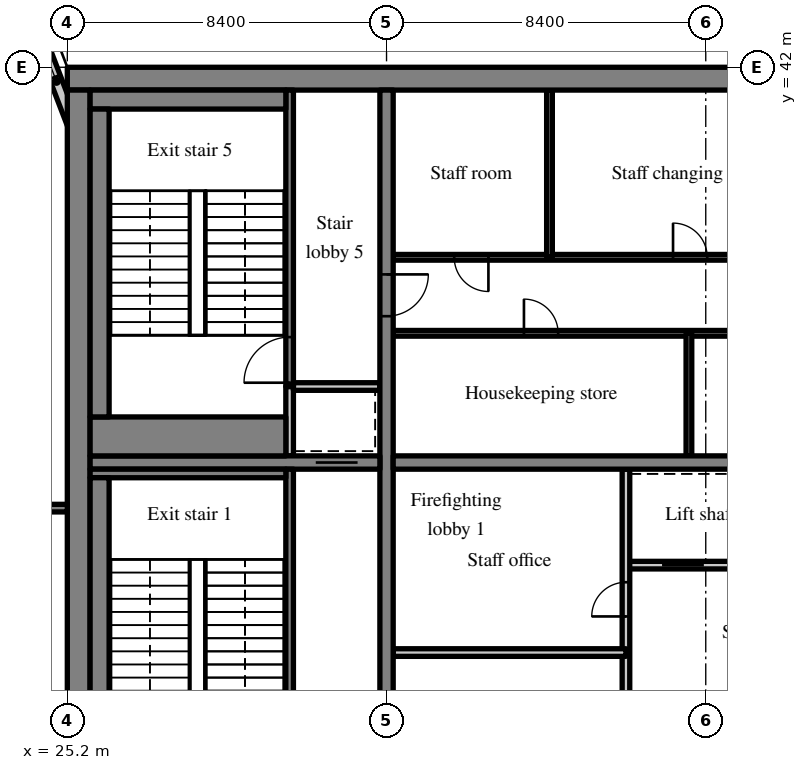
"""IFC4 building model, lengths in metres.
Left out: names, types, materials, properties, quantities, classifications, styles, units other than length and angle.
Written with IfcOpenShell. Run it as: python <this file> out.ifc"""

import sys

from ifc_helpers import new_model, si_unit, direction, frame, frame_2d, origin, place, context, subcontext, project, spatial, rectangle, extrude, source, transform, mapped, element, fill, save


model = new_model("IFC4")
c1 = context("Model", 3, precision=1e-05, world=origin(), true_north=direction((0.0, 1.0)))
c2 = subcontext(c1, "Body", "Model", "MODEL_VIEW")
j1 = project(units=[si_unit("LENGTHUNIT", "METRE"), si_unit("PLANEANGLEUNIT", "RADIAN")], contexts=[c1])
p1 = place(None, origin())
s1 = spatial("IfcSite", under=j1, at=p1, CompositionType="ELEMENT")
p2 = place(p1, origin())
s2 = spatial("IfcBuilding", under=s1, at=p2, CompositionType="ELEMENT")
p3 = place(p2, frame((0.0, 0.0, 229.6)))
s3 = spatial("IfcBuildingStorey", under=s2, at=p3, CompositionType="ELEMENT", Elevation=229.6)
m1 = source(origin(), c2, "Body", "SweptSolid", [
    extrude(rectangle(XDim=50.4, YDim=0.6, at=frame_2d((25.2, 0.0))), origin(), (0.0, 0.0, 1.0), 3.62),
])
p4 = place(p3, frame((25.2, 41.7, 0.0), z_axis=(0.0, 0.0, 1.0), x_axis=(1.0, 0.0, 0.0)))
e1 = element("IfcWall", 1, at=p4, inside=s3, PredefinedType="SHEAR", context=c2, shape_type="MappedRepresentation", body=[
    mapped(m1, transform((0.0, 0.0, 0.0), scale=1.0)),
])
m2 = source(origin(), c2, "Body", "SweptSolid", [
    extrude(rectangle(XDim=18.8, YDim=0.6, at=frame_2d((9.4, 0.0))), origin(), (0.0, 0.0, 1.0), 3.62),
])
p5 = place(p3, frame((25.5, 22.6, 0.0), z_axis=(0.0, 0.0, 1.0), x_axis=(0.0, 1.0, 0.0)))
e2 = element("IfcWall", 2, at=p5, inside=s3, PredefinedType="SHEAR", context=c2, shape_type="MappedRepresentation", body=[
    mapped(m2, transform((0.0, 0.0, 0.0), scale=1.0)),
])
m3 = source(origin(), c2, "Body", "SweptSolid", [
    extrude(rectangle(XDim=18.8, YDim=0.35, at=frame_2d((9.4, 0.0))), origin(), (0.0, 0.0, 1.0), 3.62),
])
p6 = place(p3, frame((33.6, 22.6, 0.0), z_axis=(0.0, 0.0, 1.0), x_axis=(0.0, 1.0, 0.0)))
e3 = element("IfcWall", 3, at=p6, inside=s3, PredefinedType="SHEAR", context=c2, shape_type="MappedRepresentation", body=[
    mapped(m3, transform((0.0, 0.0, 0.0), scale=1.0)),
])
m4 = source(origin(), c2, "Body", "SweptSolid", [
    extrude(rectangle(XDim=1.1, YDim=2.1, at=frame_2d((0.55, 1.05))), frame((0.0, 0.185, 0.0), z_axis=(0.0, -1.0, 0.0), x_axis=(1.0, 0.0, 0.0)), (0.0, 0.0, 1.0), 0.37),
])
p7 = place(p6, frame((12.85, 0.0, 0.0)))
e4 = element("IfcOpeningElement", 4, at=p7, cuts=e3, PredefinedType="OPENING", context=c2, shape_type="MappedRepresentation", body=[
    mapped(m4, transform((0.0, 0.0, 0.0), scale=1.0)),
])
m5 = source(origin(), c2, "Body", "SweptSolid", [
    extrude(rectangle(XDim=7.625, YDim=0.35, at=frame_2d((3.812, 0.0))), origin(), (0.0, 0.0, 1.0), 3.62),
])
p8 = place(p3, frame((25.8, 31.6, 0.0), z_axis=(0.0, 0.0, 1.0), x_axis=(1.0, 0.0, 0.0)))
e5 = element("IfcWall", 5, at=p8, inside=s3, PredefinedType="SHEAR", context=c2, shape_type="MappedRepresentation", body=[
    mapped(m5, transform((0.0, 0.0, 0.0), scale=1.0)),
])
p9 = place(p8, frame((5.938, 0.0, 0.0)))
e6 = element("IfcOpeningElement", 6, at=p9, cuts=e5, PredefinedType="OPENING", context=c2, shape_type="MappedRepresentation", body=[
    mapped(m4, transform((0.0, 0.0, 0.0), scale=1.0)),
])
m6 = source(origin(), c2, "Body", "SweptSolid", [
    extrude(rectangle(XDim=16.45, YDim=0.35, at=frame_2d((8.225, 0.0))), origin(), (0.0, 0.0, 1.0), 3.62),
])
p10 = place(p3, frame((33.775, 31.6, 0.0), z_axis=(0.0, 0.0, 1.0), x_axis=(1.0, 0.0, 0.0)))
e7 = element("IfcWall", 7, at=p10, inside=s3, PredefinedType="SHEAR", context=c2, shape_type="MappedRepresentation", body=[
    mapped(m6, transform((0.0, 0.0, 0.0), scale=1.0)),
])
m7 = source(origin(), c2, "Body", "SweptSolid", [
    extrude(rectangle(XDim=1.0, YDim=2.1, at=frame_2d((0.5, 1.05))), frame((0.0, 0.185, 0.0), z_axis=(0.0, -1.0, 0.0), x_axis=(1.0, 0.0, 0.0)), (0.0, 0.0, 1.0), 0.37),
])
p11 = place(p10, frame((14.837, 0.0, 0.0)))
e8 = element("IfcOpeningElement", 8, at=p11, cuts=e7, PredefinedType="OPENING", context=c2, shape_type="MappedRepresentation", body=[
    mapped(m7, transform((0.0, 0.0, 0.0), scale=1.0)),
])
m8 = source(origin(), c2, "Body", "SweptSolid", [
    extrude(rectangle(XDim=3.559, YDim=0.3, at=frame_2d((1.78, 0.0))), origin(), (0.0, 0.0, 1.0), 3.62),
])
p12 = place(p3, frame((25.55, 39.969, 0.0), z_axis=(0.0, 0.0, 1.0), x_axis=(-0.35779745313, 0.933799219604, 0.0)))
e9 = element("IfcWall", 9, at=p12, inside=s3, PredefinedType="SOLIDWALL", context=c2, shape_type="MappedRepresentation", body=[
    mapped(m8, transform((0.0, 0.0, 0.0), scale=1.0)),
])
m9 = source(origin(), c2, "Body", "SweptSolid", [
    extrude(rectangle(XDim=1.5, YDim=2.0, at=frame_2d((0.75, 1.0))), frame((0.0, 0.16, 0.0), z_axis=(0.0, -1.0, 0.0), x_axis=(1.0, 0.0, 0.0)), (0.0, 0.0, 1.0), 0.32),
])
p13 = place(p12, frame((1.903, 0.0, 0.9)))
e10 = element("IfcOpeningElement", 10, at=p13, cuts=e9, PredefinedType="OPENING", context=c2, shape_type="MappedRepresentation", body=[
    mapped(m9, transform((0.0, 0.0, 0.0), scale=1.0)),
])
m10 = source(origin(), c2, "Body", "SweptSolid", [
    extrude(rectangle(XDim=6.0, YDim=0.2, at=frame_2d((3.0, 0.0))), origin(), (0.0, 0.0, 1.0), 3.62),
])
p14 = place(p3, frame((39.9, 28.9, 0.0), z_axis=(0.0, 0.0, 1.0), x_axis=(1.0, 0.0, 0.0)))
e11 = element("IfcWall", 11, at=p14, inside=s3, PredefinedType="SOLIDWALL", context=c2, shape_type="MappedRepresentation", body=[
    mapped(m10, transform((0.0, 0.0, 0.0), scale=1.0)),
])
m11 = source(origin(), c2, "Body", "SweptSolid", [
    extrude(rectangle(XDim=1.1, YDim=2.1, at=frame_2d((0.55, 1.05))), frame((0.0, 0.11, 0.0), z_axis=(0.0, -1.0, 0.0), x_axis=(1.0, 0.0, 0.0)), (0.0, 0.0, 1.0), 0.22),
])
p15 = place(p14, frame((0.95, 0.0, 0.0)))
e12 = element("IfcOpeningElement", 12, at=p15, cuts=e11, PredefinedType="OPENING", context=c2, shape_type="MappedRepresentation", body=[
    mapped(m11, transform((0.0, 0.0, 0.0), scale=1.0)),
])
p16 = place(p14, frame((3.95, 0.0, 0.0)))
e13 = element("IfcOpeningElement", 13, at=p16, cuts=e11, PredefinedType="OPENING", context=c2, shape_type="MappedRepresentation", body=[
    mapped(m11, transform((0.0, 0.0, 0.0), scale=1.0)),
])
m12 = source(origin(), c2, "Body", "SweptSolid", [
    extrude(rectangle(XDim=8.825, YDim=0.2, at=frame_2d((4.413, 0.0))), origin(), (0.0, 0.0, 1.0), 3.62),
])
p17 = place(p3, frame((39.9, 22.6, 0.0), z_axis=(0.0, 0.0, 1.0), x_axis=(0.0, 1.0, 0.0)))
e14 = element("IfcWall", 14, at=p17, inside=s3, PredefinedType="PARTITIONING", context=c2, shape_type="MappedRepresentation", body=[
    mapped(m12, transform((0.0, 0.0, 0.0), scale=1.0)),
])
m13 = source(origin(), c2, "Body", "SweptSolid", [
    extrude(rectangle(XDim=0.9, YDim=2.1, at=frame_2d((0.45, 1.05))), frame((0.0, 0.11, 0.0), z_axis=(0.0, -1.0, 0.0), x_axis=(1.0, 0.0, 0.0)), (0.0, 0.0, 1.0), 0.22),
])
p18 = place(p17, frame((4.95, 0.0, 0.0)))
e15 = element("IfcOpeningElement", 15, at=p18, cuts=e14, PredefinedType="OPENING", context=c2, shape_type="MappedRepresentation", body=[
    mapped(m13, transform((0.0, 0.0, 0.0), scale=1.0)),
])
m14 = source(origin(), c2, "Body", "SweptSolid", [
    extrude(rectangle(XDim=6.125, YDim=0.2, at=frame_2d((3.062, 0.0))), origin(), (0.0, 0.0, 1.0), 3.62),
])
p19 = place(p3, frame((33.775, 26.6, 0.0), z_axis=(0.0, 0.0, 1.0), x_axis=(1.0, 0.0, 0.0)))
e16 = element("IfcWall", 16, at=p19, inside=s3, PredefinedType="PARTITIONING", context=c2, shape_type="MappedRepresentation", body=[
    mapped(m14, transform((0.0, 0.0, 0.0), scale=1.0)),
])
m15 = source(origin(), c2, "Body", "SweptSolid", [
    extrude(rectangle(XDim=14.225, YDim=0.15, at=frame_2d((7.113, 0.0))), origin(), (0.0, 0.0, 1.0), 3.62),
])
p20 = place(p3, frame((33.775, 35.0, 0.0), z_axis=(0.0, 0.0, 1.0), x_axis=(1.0, 0.0, 0.0)))
e17 = element("IfcWall", 17, at=p20, inside=s3, PredefinedType="PARTITIONING", context=c2, shape_type="MappedRepresentation", body=[
    mapped(m15, transform((0.0, 0.0, 0.0), scale=1.0)),
])
m16 = source(origin(), c2, "Body", "SweptSolid", [
    extrude(rectangle(XDim=0.9, YDim=2.1, at=frame_2d((0.45, 1.05))), frame((0.0, 0.085, 0.0), z_axis=(0.0, -1.0, 0.0), x_axis=(1.0, 0.0, 0.0)), (0.0, 0.0, 1.0), 0.17),
])
p21 = place(p20, frame((3.441, 0.0, 0.0)))
e18 = element("IfcOpeningElement", 18, at=p21, cuts=e17, PredefinedType="OPENING", context=c2, shape_type="MappedRepresentation", body=[
    mapped(m16, transform((0.0, 0.0, 0.0), scale=1.0)),
])
p22 = place(p20, frame((10.516, 0.0, 0.0)))
e19 = element("IfcOpeningElement", 19, at=p22, cuts=e17, PredefinedType="OPENING", context=c2, shape_type="MappedRepresentation", body=[
    mapped(m16, transform((0.0, 0.0, 0.0), scale=1.0)),
])
m17 = source(origin(), c2, "Body", "SweptSolid", [
    extrude(rectangle(XDim=16.45, YDim=0.15, at=frame_2d((8.225, 0.0))), origin(), (0.0, 0.0, 1.0), 3.62),
])
p23 = place(p3, frame((33.775, 37.0, 0.0), z_axis=(0.0, 0.0, 1.0), x_axis=(1.0, 0.0, 0.0)))
e20 = element("IfcWall", 20, at=p23, inside=s3, PredefinedType="PARTITIONING", context=c2, shape_type="MappedRepresentation", body=[
    mapped(m17, transform((0.0, 0.0, 0.0), scale=1.0)),
])
p24 = place(p23, frame((1.606, 0.0, 0.0)))
e21 = element("IfcOpeningElement", 21, at=p24, cuts=e20, PredefinedType="OPENING", context=c2, shape_type="MappedRepresentation", body=[
    mapped(m16, transform((0.0, 0.0, 0.0), scale=1.0)),
])
p25 = place(p23, frame((7.364, 0.0, 0.0)))
e22 = element("IfcOpeningElement", 22, at=p25, cuts=e20, PredefinedType="OPENING", context=c2, shape_type="MappedRepresentation", body=[
    mapped(m16, transform((0.0, 0.0, 0.0), scale=1.0)),
])
p26 = place(p23, frame((12.299, 0.0, 0.0)))
e23 = element("IfcOpeningElement", 23, at=p26, cuts=e20, PredefinedType="OPENING", context=c2, shape_type="MappedRepresentation", body=[
    mapped(m16, transform((0.0, 0.0, 0.0), scale=1.0)),
])
p27 = place(p23, frame((14.766, 0.0, 0.0)))
e24 = element("IfcOpeningElement", 24, at=p27, cuts=e20, PredefinedType="OPENING", context=c2, shape_type="MappedRepresentation", body=[
    mapped(m16, transform((0.0, 0.0, 0.0), scale=1.0)),
])
m18 = source(origin(), c2, "Body", "SweptSolid", [
    extrude(rectangle(XDim=3.225, YDim=0.15, at=frame_2d((1.613, 0.0))), origin(), (0.0, 0.0, 1.0), 3.62),
])
p28 = place(p3, frame((41.557, 31.775, 0.0), z_axis=(0.0, 0.0, 1.0), x_axis=(0.0, 1.0, 0.0)))
e25 = element("IfcWall", 25, at=p28, inside=s3, PredefinedType="PARTITIONING", context=c2, shape_type="MappedRepresentation", body=[
    mapped(m18, transform((0.0, 0.0, 0.0), scale=1.0)),
])
m19 = source(origin(), c2, "Body", "SweptSolid", [
    extrude(rectangle(XDim=4.4, YDim=0.15, at=frame_2d((2.2, 0.0))), origin(), (0.0, 0.0, 1.0), 3.62),
])
p29 = place(p3, frame((37.888, 37.0, 0.0), z_axis=(0.0, 0.0, 1.0), x_axis=(0.0, 1.0, 0.0)))
e26 = element("IfcWall", 26, at=p29, inside=s3, PredefinedType="PARTITIONING", context=c2, shape_type="MappedRepresentation", body=[
    mapped(m19, transform((0.0, 0.0, 0.0), scale=1.0)),
])
m20 = source(origin(), c2, "Body", "SweptSolid", [
    extrude(rectangle(XDim=8.825, YDim=0.2, at=frame_2d((4.413, 0.0))), origin(), (0.0, 0.0, 1.0), 3.62),
])
p30 = place(p3, frame((31.05, 22.6, 0.0), z_axis=(0.0, 0.0, 1.0), x_axis=(0.0, 1.0, 0.0)))
e27 = element("IfcWall", 27, at=p30, inside=s3, PredefinedType="SOLIDWALL", context=c2, shape_type="MappedRepresentation", body=[
    mapped(m20, transform((0.0, 0.0, 0.0), scale=1.0)),
])
m21 = source(origin(), c2, "Body", "SweptSolid", [
    extrude(rectangle(XDim=1.2, YDim=2.1, at=frame_2d((0.6, 1.05))), frame((0.0, 0.11, 0.0), z_axis=(0.0, -1.0, 0.0), x_axis=(1.0, 0.0, 0.0)), (0.0, 0.0, 1.0), 0.22),
])
p31 = place(p30, frame((1.0, 0.0, 0.0)))
e28 = element("IfcOpeningElement", 28, at=p31, cuts=e27, PredefinedType="OPENING", context=c2, shape_type="MappedRepresentation", body=[
    mapped(m21, transform((0.0, 0.0, 0.0), scale=1.0)),
])
m22 = source(origin(), c2, "Body", "SweptSolid", [
    extrude(rectangle(XDim=1.825, YDim=0.2, at=frame_2d((0.913, 0.0))), origin(), (0.0, 0.0, 1.0), 3.62),
])
p32 = place(p3, frame((31.05, 31.775, 0.0), z_axis=(0.0, 0.0, 1.0), x_axis=(0.0, 1.0, 0.0)))
e29 = element("IfcWall", 29, at=p32, inside=s3, PredefinedType="SOLIDWALL", context=c2, shape_type="MappedRepresentation", body=[
    mapped(m22, transform((0.0, 0.0, 0.0), scale=1.0)),
])
m23 = source(origin(), c2, "Body", "SweptSolid", [
    extrude(rectangle(XDim=2.275, YDim=0.2, at=frame_2d((1.138, 0.0))), origin(), (0.0, 0.0, 1.0), 3.62),
])
p33 = place(p3, frame((31.15, 33.6, 0.0), z_axis=(0.0, 0.0, 1.0), x_axis=(1.0, 0.0, 0.0)))
e30 = element("IfcWall", 30, at=p33, inside=s3, PredefinedType="SOLIDWALL", context=c2, shape_type="MappedRepresentation", body=[
    mapped(m23, transform((0.0, 0.0, 0.0), scale=1.0)),
])
m24 = source(origin(), c2, "Body", "SweptSolid", [
    extrude(rectangle(XDim=7.8, YDim=0.2, at=frame_2d((3.9, 0.0))), origin(), (0.0, 0.0, 1.0), 3.62),
])
p34 = place(p3, frame((31.05, 33.6, 0.0), z_axis=(0.0, 0.0, 1.0), x_axis=(0.0, 1.0, 0.0)))
e31 = element("IfcWall", 31, at=p34, inside=s3, PredefinedType="SOLIDWALL", context=c2, shape_type="MappedRepresentation", body=[
    mapped(m24, transform((0.0, 0.0, 0.0), scale=1.0)),
])
p35 = place(p34, frame((0.1, 0.0, 0.0)))
e32 = element("IfcOpeningElement", 32, at=p35, cuts=e31, PredefinedType="OPENING", context=c2, shape_type="MappedRepresentation", body=[
    mapped(m21, transform((0.0, 0.0, 0.0), scale=1.0)),
])
m25 = source(origin(), c2, "Body", "SweptSolid", [
    extrude(rectangle(XDim=8.1, YDim=0.2, at=frame_2d((4.05, 0.0))), origin(), (0.0, 0.0, 1.0), 3.62),
])
p36 = place(p3, frame((17.1, 30.4, 0.0), z_axis=(0.0, 0.0, 1.0), x_axis=(1.0, 0.0, 0.0)))
e33 = element("IfcWall", 33, at=p36, inside=s3, PredefinedType="SOLIDWALL", context=c2, shape_type="MappedRepresentation", body=[
    mapped(m25, transform((0.0, 0.0, 0.0), scale=1.0)),
])
m26 = source(origin(), c2, "Body", "SweptSolid", [
    extrude(rectangle(XDim=1.0, YDim=2.1, at=frame_2d((0.5, 1.05))), frame((0.0, 0.11, 0.0), z_axis=(0.0, -1.0, 0.0), x_axis=(1.0, 0.0, 0.0)), (0.0, 0.0, 1.0), 0.22),
])
p37 = place(p36, frame((6.0, 0.0, 0.0)))
e34 = element("IfcOpeningElement", 34, at=p37, cuts=e33, PredefinedType="OPENING", context=c2, shape_type="MappedRepresentation", body=[
    mapped(m26, transform((0.0, 0.0, 0.0), scale=1.0)),
])
m27 = source(origin(), c2, "Body", "SweptSolid", [
    extrude(rectangle(XDim=5.15, YDim=0.225, at=frame_2d((2.575, 0.0))), origin(), (0.0, 0.0, 1.0), 3.62),
])
p38 = place(p3, frame((25.8, 31.312, 0.0), z_axis=(0.0, 0.0, 1.0), x_axis=(1.0, 0.0, 0.0)))
e35 = element("IfcWall", 35, at=p38, inside=s3, PredefinedType="SOLIDWALL", context=c2, shape_type="MappedRepresentation", body=[
    mapped(m27, transform((0.0, 0.0, 0.0), scale=1.0)),
])
m28 = source(origin(), c2, "Body", "SweptSolid", [
    extrude(rectangle(XDim=8.1, YDim=0.5, at=frame_2d((4.05, 0.0))), origin(), (0.0, 0.0, 1.0), 3.62),
])
p39 = place(p3, frame((26.05, 23.1, 0.0), z_axis=(0.0, 0.0, 1.0), x_axis=(0.0, 1.0, 0.0)))
e36 = element("IfcWall", 36, at=p39, inside=s3, PredefinedType="SOLIDWALL", context=c2, shape_type="MappedRepresentation", body=[
    mapped(m28, transform((0.0, 0.0, 0.0), scale=1.0)),
])
m29 = source(origin(), c2, "Body", "SweptSolid", [
    extrude(rectangle(XDim=5.15, YDim=0.5, at=frame_2d((2.575, 0.0))), origin(), (0.0, 0.0, 1.0), 3.62),
])
p40 = place(p3, frame((25.8, 41.15, 0.0), z_axis=(0.0, 0.0, 1.0), x_axis=(1.0, 0.0, 0.0)))
e37 = element("IfcWall", 37, at=p40, inside=s3, PredefinedType="SOLIDWALL", context=c2, shape_type="MappedRepresentation", body=[
    mapped(m29, transform((0.0, 0.0, 0.0), scale=1.0)),
])
m30 = source(origin(), c2, "Body", "SweptSolid", [
    extrude(rectangle(XDim=5.15, YDim=1.025, at=frame_2d((2.575, 0.0))), origin(), (0.0, 0.0, 1.0), 3.62),
])
p41 = place(p3, frame((25.8, 32.287, 0.0), z_axis=(0.0, 0.0, 1.0), x_axis=(1.0, 0.0, 0.0)))
e38 = element("IfcWall", 38, at=p41, inside=s3, PredefinedType="SOLIDWALL", context=c2, shape_type="MappedRepresentation", body=[
    mapped(m30, transform((0.0, 0.0, 0.0), scale=1.0)),
])
p42 = place(p3, frame((26.05, 32.8, 0.0), z_axis=(0.0, 0.0, 1.0), x_axis=(0.0, 1.0, 0.0)))
e39 = element("IfcWall", 39, at=p42, inside=s3, PredefinedType="SOLIDWALL", context=c2, shape_type="MappedRepresentation", body=[
    mapped(m28, transform((0.0, 0.0, 0.0), scale=1.0)),
])
m31 = source(origin(), c2, "Body", "SweptSolid", [
    extrude(rectangle(XDim=1.5, YDim=2.0, at=frame_2d((0.75, 1.0))), frame((0.0, 0.03, 0.0), z_axis=(0.0, -1.0, 0.0), x_axis=(1.0, 0.0, 0.0)), (0.0, 0.0, 1.0), 0.06),
])
p43 = place(p13, origin())
e40 = element("IfcWindow", 40, at=p43, inside=s3, PartitioningType="SINGLE_PANEL", PredefinedType="WINDOW", context=c2, shape_type="MappedRepresentation", body=[
    mapped(m31, transform((0.0, 0.0, 0.0), scale=1.0)),
])
fill(e10, e40)
m32 = source(origin(), c2, "Body", "SweptSolid", [
    extrude(rectangle(XDim=1.1, YDim=2.1, at=frame_2d((0.55, 1.05))), frame((0.0, 0.025, 0.0), z_axis=(0.0, -1.0, 0.0), x_axis=(1.0, 0.0, 0.0)), (0.0, 0.0, 1.0), 0.05),
])
p44 = place(p15, origin())
e41 = element("IfcDoor", 41, at=p44, inside=s3, OperationType="SLIDING_TO_LEFT", PredefinedType="DOOR", context=c2, shape_type="MappedRepresentation", body=[
    mapped(m32, transform((0.0, 0.0, 0.0), scale=1.0)),
])
fill(e12, e41)
m33 = source(origin(), c2, "Body", "SweptSolid", [
    extrude(rectangle(XDim=0.9, YDim=2.1, at=frame_2d((0.45, 1.05))), frame((0.0, 0.025, 0.0), z_axis=(0.0, -1.0, 0.0), x_axis=(1.0, 0.0, 0.0)), (0.0, 0.0, 1.0), 0.05),
])
p45 = place(p18, origin())
e42 = element("IfcDoor", 42, at=p45, inside=s3, OperationType="SINGLE_SWING_LEFT", PredefinedType="DOOR", context=c2, shape_type="MappedRepresentation", body=[
    mapped(m33, transform((0.0, 0.0, 0.0), scale=1.0)),
])
fill(e15, e42)
p46 = place(p21, origin())
e43 = element("IfcDoor", 43, at=p46, inside=s3, OperationType="SINGLE_SWING_LEFT", PredefinedType="DOOR", context=c2, shape_type="MappedRepresentation", body=[
    mapped(m33, transform((0.0, 0.0, 0.0), scale=1.0)),
])
fill(e18, e43)
p47 = place(p24, origin())
e44 = element("IfcDoor", 44, at=p47, inside=s3, OperationType="SINGLE_SWING_RIGHT", PredefinedType="DOOR", context=c2, shape_type="MappedRepresentation", body=[
    mapped(m33, transform((0.0, 0.0, 0.0), scale=1.0)),
])
fill(e21, e44)
p48 = place(p25, origin())
e45 = element("IfcDoor", 45, at=p48, inside=s3, OperationType="SINGLE_SWING_LEFT", PredefinedType="DOOR", context=c2, shape_type="MappedRepresentation", body=[
    mapped(m33, transform((0.0, 0.0, 0.0), scale=1.0)),
])
fill(e22, e45)
p49 = place(p9, origin())
e46 = element("IfcDoor", 46, at=p49, inside=s3, OperationType="SLIDING_TO_LEFT", PredefinedType="DOOR", context=c2, shape_type="MappedRepresentation", body=[
    mapped(m32, transform((0.0, 0.0, 0.0), scale=1.0)),
])
fill(e6, e46)
m34 = source(origin(), c2, "Body", "SweptSolid", [
    extrude(rectangle(XDim=1.2, YDim=2.1, at=frame_2d((0.6, 1.05))), frame((0.0, 0.025, 0.0), z_axis=(0.0, -1.0, 0.0), x_axis=(1.0, 0.0, 0.0)), (0.0, 0.0, 1.0), 0.05),
])
p50 = place(p35, origin())
e47 = element("IfcDoor", 47, at=p50, inside=s3, OperationType="SINGLE_SWING_LEFT", PredefinedType="DOOR", context=c2, shape_type="MappedRepresentation", body=[
    mapped(m34, transform((0.0, 0.0, 0.0), scale=1.0)),
])
fill(e32, e47)
p51 = place(p7, origin())
e48 = element("IfcDoor", 48, at=p51, inside=s3, OperationType="SINGLE_SWING_RIGHT", PredefinedType="DOOR", context=c2, shape_type="MappedRepresentation", body=[
    mapped(m32, transform((0.0, 0.0, 0.0), scale=1.0)),
])
fill(e4, e48)
save(model, sys.argv[1])
